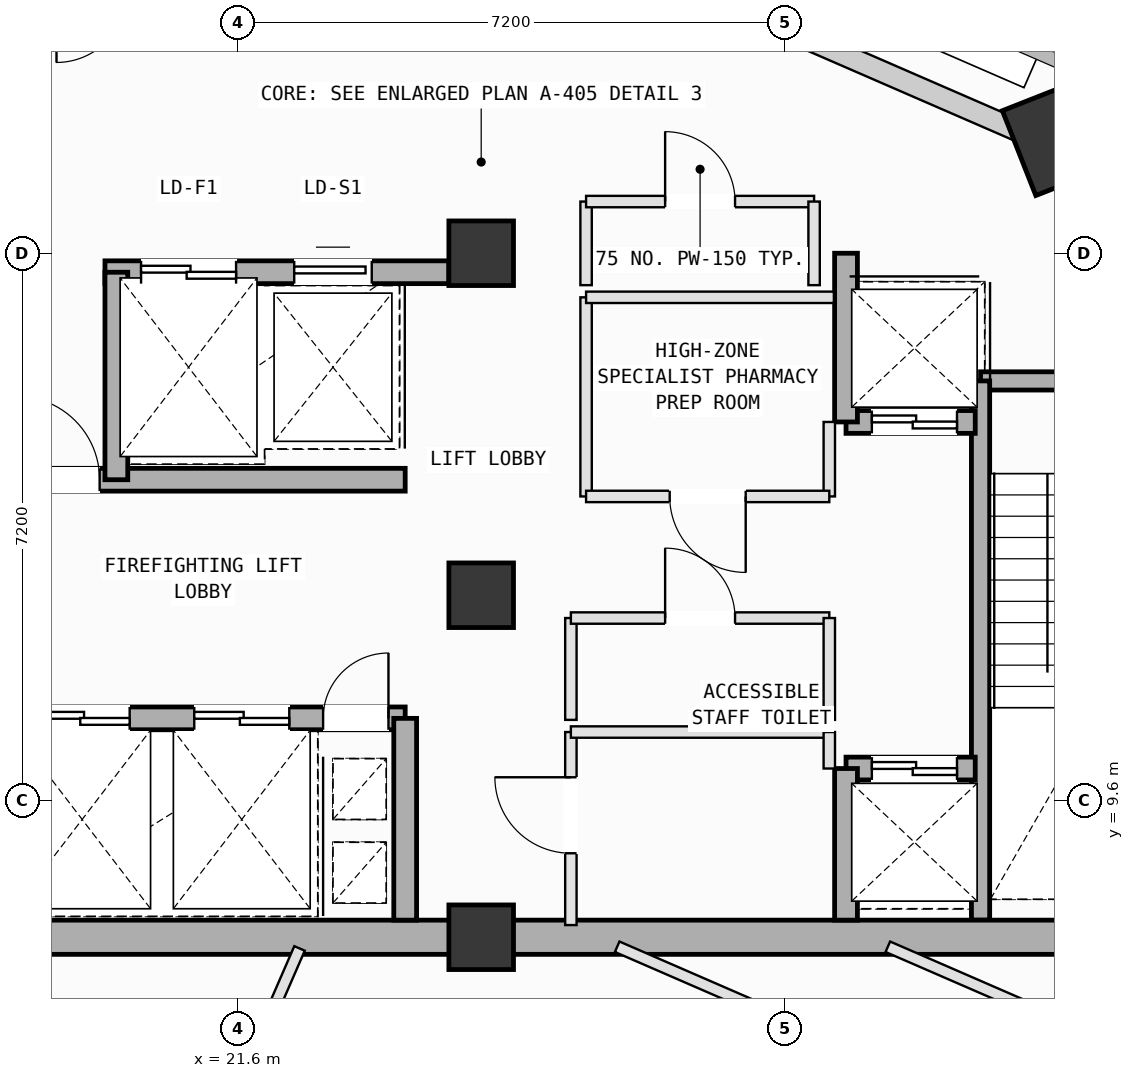
"""IFC4 building model, lengths in metres.
Left out: names, types, materials, properties, quantities, classifications, styles, units other than length and angle.
Written with IfcOpenShell. Run it as: python <this file> out.ifc"""

import sys

from ifc_helpers import new_model, si_unit, direction, frame, frame_2d, origin, origin_2d, place, context, subcontext, project, spatial, rectangle, extrude, element, fill, save


model = new_model("IFC4")
c1 = context("Model", 3, precision=1e-05, world=origin(), true_north=direction((0.0, 1.0)))
c2 = subcontext(c1, "Body", "Model", "MODEL_VIEW")
j1 = project(units=[si_unit("LENGTHUNIT", "METRE"), si_unit("PLANEANGLEUNIT", "RADIAN")], contexts=[c1])
p1 = place(None, origin())
s1 = spatial("IfcSite", under=j1, at=p1, CompositionType="ELEMENT")
p2 = place(p1, origin())
s2 = spatial("IfcBuilding", under=s1, at=p2, CompositionType="ELEMENT")
p3 = place(p2, frame((0.0, 0.0, 316.6)))
s3 = spatial("IfcBuildingStorey", under=s2, at=p3, CompositionType="ELEMENT", Elevation=316.6)
for number, where, z_axis, x_axis in (
    (1, (24.8, 7.8, 0.0), (0.0, 0.0, 1.0), (1.0, 0.0, 0.0)),
    (2, (24.8, 12.3, 0.0), (0.0, 0.0, 1.0), (1.0, 0.0, 0.0)),
    (3, (24.8, 16.8, 0.0), (0.0, 0.0, 1.0), (1.0, 0.0, 0.0)),
):
    element("IfcColumn", number, at=place(p3, frame(where, z_axis=z_axis, x_axis=x_axis)), inside=s3, PredefinedType="COLUMN", context=c2, shape_type="SweptSolid", body=[
        extrude(rectangle(XDim=0.85, YDim=0.85, at=origin_2d()), origin(), (0.0, 0.0, 1.0), 4.0),
    ])
p4 = place(p3, frame((32.226, 18.255, 0.002), z_axis=(0.0, 0.0, 1.0), x_axis=(-0.366501226724, 0.930417567982, 0.0)))
e4 = element("IfcColumn", 4, at=p4, inside=s3, PredefinedType="COLUMN", context=c2, shape_type="SweptSolid", body=[
    extrude(rectangle(XDim=1.2, YDim=0.75, at=origin_2d()), origin(), (0.0, 0.0, 1.0), 3.996),
])
p5 = place(p3, frame((32.385, 18.619, 0.0), z_axis=(0.0, 0.0, 1.0), x_axis=(0.398753668733, 0.917058074318, 0.0)))
e5 = element("IfcWall", 5, at=p5, inside=s3, PredefinedType="SOLIDWALL", context=c2, shape_type="SweptSolid", body=[
    extrude(rectangle(XDim=6.155, YDim=0.28, at=frame_2d((3.078, 0.0))), origin(), (0.0, 0.0, 1.0), 3.265),
])
p6 = place(p3, frame((25.484, 21.187, 0.0), z_axis=(0.0, 0.0, 1.0), x_axis=(0.917060568388, -0.398747932794, 0.0)))
e6 = element("IfcWall", 6, at=p6, inside=s3, PredefinedType="SOLIDWALL", context=c2, shape_type="SweptSolid", body=[
    extrude(rectangle(XDim=6.955, YDim=0.28, at=frame_2d((3.478, 0.0))), origin(), (0.0, 0.0, 1.0), 2.765),
])
p7 = place(p3, frame((31.37, 15.12, 0.0), z_axis=(0.0, 0.0, 1.0), x_axis=(1.0, 0.0, 0.0)))
e7 = element("IfcWall", 7, at=p7, inside=s3, PredefinedType="SOLIDWALL", context=c2, shape_type="SweptSolid", body=[
    extrude(rectangle(XDim=3.46, YDim=0.24, at=frame_2d((1.73, 0.0))), origin(), (0.0, 0.0, 1.0), 3.78),
])
p8 = place(p7, frame((2.14, 0.0, 0.0)))
e8 = element("IfcOpeningElement", 8, at=p8, cuts=e7, PredefinedType="OPENING", context=c2, shape_type="SweptSolid", body=[
    extrude(rectangle(XDim=1.1, YDim=2.15, at=frame_2d((0.55, 1.075))), frame((0.0, 0.13, 0.0), z_axis=(0.0, -1.0, 0.0), x_axis=(1.0, 0.0, 0.0)), (0.0, 0.0, 1.0), 0.26),
])
p9 = place(p3, frame((31.37, 8.025, 0.0), z_axis=(0.0, 0.0, 1.0), x_axis=(0.0, 1.0, 0.0)))
e9 = element("IfcWall", 9, at=p9, inside=s3, PredefinedType="SOLIDWALL", context=c2, shape_type="SweptSolid", body=[
    extrude(rectangle(XDim=7.095, YDim=0.24, at=frame_2d((3.548, 0.0))), origin(), (0.0, 0.0, 1.0), 3.78),
])
for number, where, z_axis, x_axis in (
    (10, (14.0, 7.8, 0.0), (0.0, 0.0, 1.0), (1.0, 0.0, 0.0)),
    (11, (24.8, 7.8, 0.0), (0.0, 0.0, 1.0), (1.0, 0.0, 0.0)),
):
    element("IfcWall", number, at=place(p3, frame(where, z_axis=z_axis, x_axis=x_axis)), inside=s3, PredefinedType="SHEAR", context=c2, shape_type="SweptSolid", body=[
        extrude(rectangle(XDim=10.8, YDim=0.45, at=frame_2d((5.4, 0.0))), origin(), (0.0, 0.0, 1.0), 3.78),
    ])
p10 = place(p3, frame((19.85, 16.55, 0.0), z_axis=(0.0, 0.0, 1.0), x_axis=(1.0, 0.0, 0.0)))
e12 = element("IfcWall", 12, at=p10, inside=s3, PredefinedType="SOLIDWALL", context=c2, shape_type="SweptSolid", body=[
    extrude(rectangle(XDim=4.525, YDim=0.3, at=frame_2d((2.262, 0.0))), origin(), (0.0, 0.0, 1.0), 3.78),
])
p11 = place(p10, frame((0.475, 0.0, 0.0)))
e13 = element("IfcOpeningElement", 13, at=p11, cuts=e12, PredefinedType="OPENING", context=c2, shape_type="SweptSolid", body=[
    extrude(rectangle(XDim=1.25, YDim=2.18, at=frame_2d((0.625, 1.09))), frame((0.0, 0.16, 0.0), z_axis=(0.0, -1.0, 0.0), x_axis=(1.0, 0.0, 0.0)), (0.0, 0.0, 1.0), 0.32),
])
p12 = place(p10, frame((2.49, 0.0, 0.0)))
e14 = element("IfcOpeningElement", 14, at=p12, cuts=e12, PredefinedType="OPENING", context=c2, shape_type="SweptSolid", body=[
    extrude(rectangle(XDim=1.02, YDim=2.12, at=frame_2d((0.51, 1.06))), frame((0.0, 0.16, 0.0), z_axis=(0.0, -1.0, 0.0), x_axis=(1.0, 0.0, 0.0)), (0.0, 0.0, 1.0), 0.32),
])
p13 = place(p3, frame((18.5, 10.68, 0.0), z_axis=(0.0, 0.0, 1.0), x_axis=(1.0, 0.0, 0.0)))
e15 = element("IfcWall", 15, at=p13, inside=s3, PredefinedType="SOLIDWALL", context=c2, shape_type="SweptSolid", body=[
    extrude(rectangle(XDim=5.3, YDim=0.3, at=frame_2d((2.65, 0.0))), origin(), (0.0, 0.0, 1.0), 3.78),
])
p14 = place(p13, frame((4.22, 0.0, 0.0)))
e16 = element("IfcOpeningElement", 16, at=p14, cuts=e15, PredefinedType="OPENING", context=c2, shape_type="SweptSolid", body=[
    extrude(rectangle(XDim=0.86, YDim=2.06, at=frame_2d((0.43, 1.03))), frame((0.0, 0.16, 0.0), z_axis=(0.0, -1.0, 0.0), x_axis=(1.0, 0.0, 0.0)), (0.0, 0.0, 1.0), 0.32),
])
p15 = place(p13, frame((0.425, 0.0, 0.0)))
e17 = element("IfcOpeningElement", 17, at=p15, cuts=e15, PredefinedType="OPENING", context=c2, shape_type="SweptSolid", body=[
    extrude(rectangle(XDim=1.25, YDim=2.18, at=frame_2d((0.625, 1.09))), frame((0.0, 0.16, 0.0), z_axis=(0.0, -1.0, 0.0), x_axis=(1.0, 0.0, 0.0)), (0.0, 0.0, 1.0), 0.32),
])
p16 = place(p13, frame((2.525, 0.0, 0.0)))
e18 = element("IfcOpeningElement", 18, at=p16, cuts=e15, PredefinedType="OPENING", context=c2, shape_type="SweptSolid", body=[
    extrude(rectangle(XDim=1.25, YDim=2.18, at=frame_2d((0.625, 1.09))), frame((0.0, 0.16, 0.0), z_axis=(0.0, -1.0, 0.0), x_axis=(1.0, 0.0, 0.0)), (0.0, 0.0, 1.0), 0.32),
])
p17 = place(p3, frame((18.5, 13.82, 0.0), z_axis=(0.0, 0.0, 1.0), x_axis=(1.0, 0.0, 0.0)))
e19 = element("IfcWall", 19, at=p17, inside=s3, PredefinedType="SOLIDWALL", context=c2, shape_type="SweptSolid", body=[
    extrude(rectangle(XDim=5.3, YDim=0.3, at=frame_2d((2.65, 0.0))), origin(), (0.0, 0.0, 1.0), 3.78),
])
p18 = place(p17, frame((0.18, 0.0, 0.0)))
e20 = element("IfcOpeningElement", 20, at=p18, cuts=e19, PredefinedType="OPENING", context=c2, shape_type="SweptSolid", body=[
    extrude(rectangle(XDim=1.1, YDim=2.15, at=frame_2d((0.55, 1.075))), frame((0.0, 0.16, 0.0), z_axis=(0.0, -1.0, 0.0), x_axis=(1.0, 0.0, 0.0)), (0.0, 0.0, 1.0), 0.32),
])
p19 = place(p3, frame((23.8, 8.025, 0.0), z_axis=(0.0, 0.0, 1.0), x_axis=(0.0, 1.0, 0.0)))
e21 = element("IfcWall", 21, at=p19, inside=s3, PredefinedType="SOLIDWALL", context=c2, shape_type="SweptSolid", body=[
    extrude(rectangle(XDim=2.655, YDim=0.3, at=frame_2d((1.328, 0.0))), origin(), (0.0, 0.0, 1.0), 3.78),
])
p20 = place(p3, frame((20.0, 13.82, 0.0), z_axis=(0.0, 0.0, 1.0), x_axis=(0.0, 1.0, 0.0)))
e22 = element("IfcWall", 22, at=p20, inside=s3, PredefinedType="SOLIDWALL", context=c2, shape_type="SweptSolid", body=[
    extrude(rectangle(XDim=2.73, YDim=0.3, at=frame_2d((1.365, 0.0))), origin(), (0.0, 0.0, 1.0), 3.78),
])
p21 = place(p3, frame((29.6, 10.02, 0.0), z_axis=(0.0, 0.0, 1.0), x_axis=(1.0, 0.0, 0.0)))
e23 = element("IfcWall", 23, at=p21, inside=s3, PredefinedType="SOLIDWALL", context=c2, shape_type="SweptSolid", body=[
    extrude(rectangle(XDim=1.7, YDim=0.3, at=frame_2d((0.85, 0.0))), origin(), (0.0, 0.0, 1.0), 3.78),
])
p22 = place(p21, frame((0.34, 0.0, 0.0)))
e24 = element("IfcOpeningElement", 24, at=p22, cuts=e23, PredefinedType="OPENING", context=c2, shape_type="SweptSolid", body=[
    extrude(rectangle(XDim=1.12, YDim=2.15, at=frame_2d((0.56, 1.075))), frame((0.0, 0.16, 0.0), z_axis=(0.0, -1.0, 0.0), x_axis=(1.0, 0.0, 0.0)), (0.0, 0.0, 1.0), 0.32),
])
p23 = place(p3, frame((29.6, 8.025, 0.0), z_axis=(0.0, 0.0, 1.0), x_axis=(0.0, 1.0, 0.0)))
e25 = element("IfcWall", 25, at=p23, inside=s3, PredefinedType="SOLIDWALL", context=c2, shape_type="SweptSolid", body=[
    extrude(rectangle(XDim=1.995, YDim=0.3, at=frame_2d((0.998, 0.0))), origin(), (0.0, 0.0, 1.0), 3.78),
])
p24 = place(p3, frame((29.6, 14.58, 0.0), z_axis=(0.0, 0.0, 1.0), x_axis=(1.0, 0.0, 0.0)))
e26 = element("IfcWall", 26, at=p24, inside=s3, PredefinedType="SOLIDWALL", context=c2, shape_type="SweptSolid", body=[
    extrude(rectangle(XDim=1.7, YDim=0.3, at=frame_2d((0.85, 0.0))), origin(), (0.0, 0.0, 1.0), 3.78),
])
p25 = place(p24, frame((0.34, 0.0, 0.0)))
e27 = element("IfcOpeningElement", 27, at=p25, cuts=e26, PredefinedType="OPENING", context=c2, shape_type="SweptSolid", body=[
    extrude(rectangle(XDim=1.12, YDim=2.15, at=frame_2d((0.56, 1.075))), frame((0.0, 0.16, 0.0), z_axis=(0.0, -1.0, 0.0), x_axis=(1.0, 0.0, 0.0)), (0.0, 0.0, 1.0), 0.32),
])
p26 = place(p3, frame((29.6, 14.58, 0.0), z_axis=(0.0, 0.0, 1.0), x_axis=(0.0, 1.0, 0.0)))
e28 = element("IfcWall", 28, at=p26, inside=s3, PredefinedType="SOLIDWALL", context=c2, shape_type="SweptSolid", body=[
    extrude(rectangle(XDim=2.22, YDim=0.3, at=frame_2d((1.11, 0.0))), origin(), (0.0, 0.0, 1.0), 3.78),
])
p27 = place(p3, frame((25.98, 7.96, 0.0), z_axis=(0.0, 0.0, 1.0), x_axis=(0.0, 1.0, 0.0)))
e29 = element("IfcWall", 29, at=p27, inside=s3, PredefinedType="PARTITIONING", context=c2, shape_type="SweptSolid", body=[
    extrude(rectangle(XDim=2.54, YDim=0.15, at=frame_2d((1.27, 0.0))), origin(), (0.0, 0.0, 1.0), 3.78),
])
p28 = place(p27, frame((0.945, 0.0, 0.0)))
e30 = element("IfcOpeningElement", 30, at=p28, cuts=e29, PredefinedType="OPENING", context=c2, shape_type="SweptSolid", body=[
    extrude(rectangle(XDim=1.0, YDim=2.12, at=frame_2d((0.5, 1.06))), frame((0.0, 0.085, 0.0), z_axis=(0.0, -1.0, 0.0), x_axis=(1.0, 0.0, 0.0)), (0.0, 0.0, 1.0), 0.17),
])
p29 = place(p3, frame((25.98, 10.5, 0.0), z_axis=(0.0, 0.0, 1.0), x_axis=(1.0, 0.0, 0.0)))
e31 = element("IfcWall", 31, at=p29, inside=s3, PredefinedType="PARTITIONING", context=c2, shape_type="SweptSolid", body=[
    extrude(rectangle(XDim=3.4, YDim=0.15, at=frame_2d((1.7, 0.0))), origin(), (0.0, 0.0, 1.0), 3.78),
])
p30 = place(p3, frame((29.38, 10.5, 0.0), z_axis=(0.0, 0.0, 1.0), x_axis=(0.0, -1.0, 0.0)))
e32 = element("IfcWall", 32, at=p30, inside=s3, PredefinedType="PARTITIONING", context=c2, shape_type="SweptSolid", body=[
    extrude(rectangle(XDim=0.48, YDim=0.15, at=frame_2d((0.24, 0.0))), origin(), (0.0, 0.0, 1.0), 3.78),
])
p31 = place(p3, frame((25.98, 10.66, 0.0), z_axis=(0.0, 0.0, 1.0), x_axis=(0.0, 1.0, 0.0)))
e33 = element("IfcWall", 33, at=p31, inside=s3, PredefinedType="PARTITIONING", context=c2, shape_type="SweptSolid", body=[
    extrude(rectangle(XDim=1.34, YDim=0.15, at=frame_2d((0.67, 0.0))), origin(), (0.0, 0.0, 1.0), 3.78),
])
p32 = place(p3, frame((25.98, 12.0, 0.0), z_axis=(0.0, 0.0, 1.0), x_axis=(1.0, 0.0, 0.0)))
e34 = element("IfcWall", 34, at=p32, inside=s3, PredefinedType="PARTITIONING", context=c2, shape_type="SweptSolid", body=[
    extrude(rectangle(XDim=3.4, YDim=0.15, at=frame_2d((1.7, 0.0))), origin(), (0.0, 0.0, 1.0), 3.78),
])
p33 = place(p32, frame((1.24, 0.0, 0.0)))
e35 = element("IfcOpeningElement", 35, at=p33, cuts=e34, PredefinedType="OPENING", context=c2, shape_type="SweptSolid", body=[
    extrude(rectangle(XDim=0.92, YDim=2.1, at=frame_2d((0.46, 1.05))), frame((0.0, 0.085, 0.0), z_axis=(0.0, -1.0, 0.0), x_axis=(1.0, 0.0, 0.0)), (0.0, 0.0, 1.0), 0.17),
])
p34 = place(p3, frame((29.38, 12.0, 0.0), z_axis=(0.0, 0.0, 1.0), x_axis=(0.0, -1.0, 0.0)))
e36 = element("IfcWall", 36, at=p34, inside=s3, PredefinedType="PARTITIONING", context=c2, shape_type="SweptSolid", body=[
    extrude(rectangle(XDim=1.34, YDim=0.15, at=frame_2d((0.67, 0.0))), origin(), (0.0, 0.0, 1.0), 3.78),
])
p35 = place(p3, frame((26.18, 13.6, 0.0), z_axis=(0.0, 0.0, 1.0), x_axis=(0.0, 1.0, 0.0)))
e37 = element("IfcWall", 37, at=p35, inside=s3, PredefinedType="PARTITIONING", context=c2, shape_type="SweptSolid", body=[
    extrude(rectangle(XDim=2.62, YDim=0.15, at=frame_2d((1.31, 0.0))), origin(), (0.0, 0.0, 1.0), 3.78),
])
p36 = place(p3, frame((26.18, 16.22, 0.0), z_axis=(0.0, 0.0, 1.0), x_axis=(1.0, 0.0, 0.0)))
e38 = element("IfcWall", 38, at=p36, inside=s3, PredefinedType="PARTITIONING", context=c2, shape_type="SweptSolid", body=[
    extrude(rectangle(XDim=3.26, YDim=0.15, at=frame_2d((1.63, 0.0))), origin(), (0.0, 0.0, 1.0), 3.78),
])
p37 = place(p3, frame((29.38, 14.58, 0.0), z_axis=(0.0, 0.0, 1.0), x_axis=(0.0, -1.0, 0.0)))
e39 = element("IfcWall", 39, at=p37, inside=s3, PredefinedType="PARTITIONING", context=c2, shape_type="SweptSolid", body=[
    extrude(rectangle(XDim=0.98, YDim=0.15, at=frame_2d((0.49, 0.0))), origin(), (0.0, 0.0, 1.0), 3.78),
])
p38 = place(p3, frame((29.38, 13.6, 0.0), z_axis=(0.0, 0.0, 1.0), x_axis=(-1.0, 0.0, 0.0)))
e40 = element("IfcWall", 40, at=p38, inside=s3, PredefinedType="PARTITIONING", context=c2, shape_type="SweptSolid", body=[
    extrude(rectangle(XDim=3.2, YDim=0.15, at=frame_2d((1.6, 0.0))), origin(), (0.0, 0.0, 1.0), 3.78),
])
p39 = place(p38, frame((1.1, 0.0, 0.0)))
e41 = element("IfcOpeningElement", 41, at=p39, cuts=e40, PredefinedType="OPENING", context=c2, shape_type="SweptSolid", body=[
    extrude(rectangle(XDim=1.0, YDim=2.12, at=frame_2d((0.5, 1.06))), frame((0.0, 0.085, 0.0), z_axis=(0.0, -1.0, 0.0), x_axis=(1.0, 0.0, 0.0)), (0.0, 0.0, 1.0), 0.17),
])
p40 = place(p3, frame((26.18, 16.38, 0.0), z_axis=(0.0, 0.0, 1.0), x_axis=(0.0, 1.0, 0.0)))
e42 = element("IfcWall", 42, at=p40, inside=s3, PredefinedType="PARTITIONING", context=c2, shape_type="SweptSolid", body=[
    extrude(rectangle(XDim=1.1, YDim=0.15, at=frame_2d((0.55, 0.0))), origin(), (0.0, 0.0, 1.0), 3.78),
])
p41 = place(p3, frame((26.18, 17.48, 0.0), z_axis=(0.0, 0.0, 1.0), x_axis=(1.0, 0.0, 0.0)))
e43 = element("IfcWall", 43, at=p41, inside=s3, PredefinedType="PARTITIONING", context=c2, shape_type="SweptSolid", body=[
    extrude(rectangle(XDim=3.0, YDim=0.15, at=frame_2d((1.5, 0.0))), origin(), (0.0, 0.0, 1.0), 3.78),
])
p42 = place(p41, frame((1.04, 0.0, 0.0)))
e44 = element("IfcOpeningElement", 44, at=p42, cuts=e43, PredefinedType="OPENING", context=c2, shape_type="SweptSolid", body=[
    extrude(rectangle(XDim=0.92, YDim=2.1, at=frame_2d((0.46, 1.05))), frame((0.0, 0.085, 0.0), z_axis=(0.0, -1.0, 0.0), x_axis=(1.0, 0.0, 0.0)), (0.0, 0.0, 1.0), 0.17),
])
p43 = place(p3, frame((29.18, 17.48, 0.0), z_axis=(0.0, 0.0, 1.0), x_axis=(0.0, -1.0, 0.0)))
e45 = element("IfcWall", 45, at=p43, inside=s3, PredefinedType="PARTITIONING", context=c2, shape_type="SweptSolid", body=[
    extrude(rectangle(XDim=1.1, YDim=0.15, at=frame_2d((0.55, 0.0))), origin(), (0.0, 0.0, 1.0), 3.78),
])
p44 = place(p3, frame((20.345, 2.905, 0.0), z_axis=(0.0, 0.0, 1.0), x_axis=(0.398819215719, 0.917029570501, 0.0)))
e46 = element("IfcWall", 46, at=p44, inside=s3, PredefinedType="PARTITIONING", context=c2, shape_type="SweptSolid", body=[
    extrude(rectangle(XDim=5.178, YDim=0.15, at=frame_2d((2.589, 0.0))), origin(), (0.0, 0.0, 1.0), 3.78),
])
p45 = place(p44, frame((2.075, 0.0, 0.0)))
e47 = element("IfcOpeningElement", 47, at=p45, cuts=e46, PredefinedType="OPENING", context=c2, shape_type="SweptSolid", body=[
    extrude(rectangle(XDim=0.86, YDim=2.06, at=frame_2d((0.43, 1.03))), frame((0.0, 0.085, 0.0), z_axis=(0.0, -1.0, 0.0), x_axis=(1.0, 0.0, 0.0)), (0.0, 0.0, 1.0), 0.17),
])
p46 = place(p3, frame((26.589, 7.675, 0.0), z_axis=(0.0, 0.0, 1.0), x_axis=(0.917085632944, -0.398690283112, 0.0)))
e48 = element("IfcWall", 48, at=p46, inside=s3, PredefinedType="PARTITIONING", context=c2, shape_type="SweptSolid", body=[
    extrude(rectangle(XDim=10.216, YDim=0.15, at=frame_2d((5.108, 0.0))), origin(), (0.0, 0.0, 1.0), 3.78),
])
p47 = place(p46, frame((5.131, 0.0, 0.0)))
e49 = element("IfcOpeningElement", 49, at=p47, cuts=e48, PredefinedType="OPENING", context=c2, shape_type="SweptSolid", body=[
    extrude(rectangle(XDim=0.86, YDim=2.06, at=frame_2d((0.43, 1.03))), frame((0.0, 0.085, 0.0), z_axis=(0.0, -1.0, 0.0), x_axis=(1.0, 0.0, 0.0)), (0.0, 0.0, 1.0), 0.17),
])
p48 = place(p3, frame((30.15, 7.675, 0.0), z_axis=(0.0, 0.0, 1.0), x_axis=(0.917103960726, -0.398648122059, 0.0)))
e50 = element("IfcWall", 50, at=p48, inside=s3, PredefinedType="PARTITIONING", context=c2, shape_type="SweptSolid", body=[
    extrude(rectangle(XDim=5.266, YDim=0.15, at=frame_2d((2.633, 0.0))), origin(), (0.0, 0.0, 1.0), 3.78),
])
p49 = place(p14, origin())
e51 = element("IfcDoor", 51, at=p49, inside=s3, OperationType="SINGLE_SWING_RIGHT", PredefinedType="DOOR", context=c2, shape_type="SweptSolid", body=[
    extrude(rectangle(XDim=0.86, YDim=2.06, at=frame_2d((0.43, 1.03))), frame((0.0, 0.025, 0.0), z_axis=(0.0, -1.0, 0.0), x_axis=(1.0, 0.0, 0.0)), (0.0, 0.0, 1.0), 0.05),
])
fill(e16, e51)
p50 = place(p18, origin())
e52 = element("IfcDoor", 52, at=p50, inside=s3, OperationType="SINGLE_SWING_LEFT", PredefinedType="DOOR", context=c2, shape_type="SweptSolid", body=[
    extrude(rectangle(XDim=1.1, YDim=2.15, at=frame_2d((0.55, 1.075))), frame((0.0, 0.025, 0.0), z_axis=(0.0, -1.0, 0.0), x_axis=(1.0, 0.0, 0.0)), (0.0, 0.0, 1.0), 0.05),
])
fill(e20, e52)
p51 = place(p15, origin())
e53 = element("IfcDoor", 53, at=p51, inside=s3, OperationType="DOUBLE_DOOR_SLIDING", PredefinedType="DOOR", context=c2, shape_type="SweptSolid", body=[
    extrude(rectangle(XDim=1.25, YDim=2.18, at=frame_2d((0.625, 1.09))), frame((0.0, 0.025, 0.0), z_axis=(0.0, -1.0, 0.0), x_axis=(1.0, 0.0, 0.0)), (0.0, 0.0, 1.0), 0.05),
])
fill(e17, e53)
p52 = place(p16, origin())
e54 = element("IfcDoor", 54, at=p52, inside=s3, OperationType="DOUBLE_DOOR_SLIDING", PredefinedType="DOOR", context=c2, shape_type="SweptSolid", body=[
    extrude(rectangle(XDim=1.25, YDim=2.18, at=frame_2d((0.625, 1.09))), frame((0.0, 0.025, 0.0), z_axis=(0.0, -1.0, 0.0), x_axis=(1.0, 0.0, 0.0)), (0.0, 0.0, 1.0), 0.05),
])
fill(e18, e54)
p53 = place(p22, origin())
e55 = element("IfcDoor", 55, at=p53, inside=s3, OperationType="DOUBLE_DOOR_SLIDING", PredefinedType="DOOR", context=c2, shape_type="SweptSolid", body=[
    extrude(rectangle(XDim=1.12, YDim=2.15, at=frame_2d((0.56, 1.075))), frame((0.0, 0.025, 0.0), z_axis=(0.0, -1.0, 0.0), x_axis=(1.0, 0.0, 0.0)), (0.0, 0.0, 1.0), 0.05),
])
fill(e24, e55)
p54 = place(p25, origin())
e56 = element("IfcDoor", 56, at=p54, inside=s3, OperationType="DOUBLE_DOOR_SLIDING", PredefinedType="DOOR", context=c2, shape_type="SweptSolid", body=[
    extrude(rectangle(XDim=1.12, YDim=2.15, at=frame_2d((0.56, 1.075))), frame((0.0, 0.025, 0.0), z_axis=(0.0, -1.0, 0.0), x_axis=(1.0, 0.0, 0.0)), (0.0, 0.0, 1.0), 0.05),
])
fill(e27, e56)
p55 = place(p11, origin())
e57 = element("IfcDoor", 57, at=p55, inside=s3, OperationType="DOUBLE_DOOR_SLIDING", PredefinedType="DOOR", context=c2, shape_type="SweptSolid", body=[
    extrude(rectangle(XDim=1.25, YDim=2.18, at=frame_2d((0.625, 1.09))), frame((0.0, 0.025, 0.0), z_axis=(0.0, -1.0, 0.0), x_axis=(1.0, 0.0, 0.0)), (0.0, 0.0, 1.0), 0.05),
])
fill(e13, e57)
p56 = place(p12, origin())
e58 = element("IfcDoor", 58, at=p56, inside=s3, OperationType="SLIDING_TO_LEFT", PredefinedType="DOOR", context=c2, shape_type="SweptSolid", body=[
    extrude(rectangle(XDim=1.02, YDim=2.12, at=frame_2d((0.51, 1.06))), frame((0.0, 0.025, 0.0), z_axis=(0.0, -1.0, 0.0), x_axis=(1.0, 0.0, 0.0)), (0.0, 0.0, 1.0), 0.05),
])
fill(e14, e58)
p57 = place(p28, origin())
e59 = element("IfcDoor", 59, at=p57, inside=s3, OperationType="SINGLE_SWING_RIGHT", PredefinedType="DOOR", context=c2, shape_type="SweptSolid", body=[
    extrude(rectangle(XDim=1.0, YDim=2.12, at=frame_2d((0.5, 1.06))), frame((0.0, 0.025, 0.0), z_axis=(0.0, -1.0, 0.0), x_axis=(1.0, 0.0, 0.0)), (0.0, 0.0, 1.0), 0.05),
])
fill(e30, e59)
p58 = place(p33, origin())
e60 = element("IfcDoor", 60, at=p58, inside=s3, OperationType="SINGLE_SWING_LEFT", PredefinedType="DOOR", context=c2, shape_type="SweptSolid", body=[
    extrude(rectangle(XDim=0.92, YDim=2.1, at=frame_2d((0.46, 1.05))), frame((0.0, 0.025, 0.0), z_axis=(0.0, -1.0, 0.0), x_axis=(1.0, 0.0, 0.0)), (0.0, 0.0, 1.0), 0.05),
])
fill(e35, e60)
p59 = place(p39, origin())
e61 = element("IfcDoor", 61, at=p59, inside=s3, OperationType="SINGLE_SWING_LEFT", PredefinedType="DOOR", context=c2, shape_type="SweptSolid", body=[
    extrude(rectangle(XDim=1.0, YDim=2.12, at=frame_2d((0.5, 1.06))), frame((0.0, 0.025, 0.0), z_axis=(0.0, -1.0, 0.0), x_axis=(1.0, 0.0, 0.0)), (0.0, 0.0, 1.0), 0.05),
])
fill(e41, e61)
p60 = place(p42, origin())
e62 = element("IfcDoor", 62, at=p60, inside=s3, OperationType="SINGLE_SWING_LEFT", PredefinedType="DOOR", context=c2, shape_type="SweptSolid", body=[
    extrude(rectangle(XDim=0.92, YDim=2.1, at=frame_2d((0.46, 1.05))), frame((0.0, 0.025, 0.0), z_axis=(0.0, -1.0, 0.0), x_axis=(1.0, 0.0, 0.0)), (0.0, 0.0, 1.0), 0.05),
])
fill(e44, e62)
save(model, sys.argv[1])
